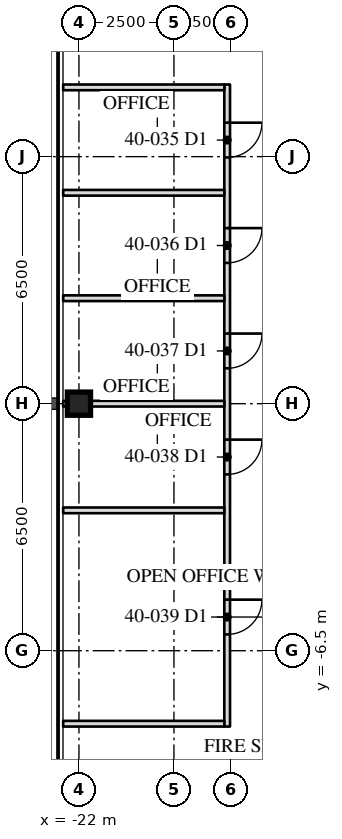
"""IFC4 building model, lengths in metres.
Left out: names, types, materials, properties, quantities, classifications, styles, units other than length and angle.
Written with IfcOpenShell. Run it as: python <this file> out.ifc"""

import sys

from ifc_helpers import new_model, si_unit, direction, frame, frame_2d, origin, origin_2d, place, context, subcontext, project, spatial, rectangle, hollow_rectangle, extrude, element, fill, save


model = new_model("IFC4")
c1 = context("Model", 3, precision=1e-05, world=origin(), true_north=direction((0.0, 1.0)))
c2 = subcontext(c1, "Body", "Model", "MODEL_VIEW")
j1 = project(units=[si_unit("LENGTHUNIT", "METRE"), si_unit("PLANEANGLEUNIT", "RADIAN")], contexts=[c1])
p1 = place(None, origin())
s1 = spatial("IfcSite", under=j1, at=p1, CompositionType="ELEMENT")
p2 = place(p1, origin())
s2 = spatial("IfcBuilding", under=s1, at=p2, CompositionType="ELEMENT")
p3 = place(p2, frame((0.0, 0.0, 170.5)))
s3 = spatial("IfcBuildingStorey", under=s2, at=p3, CompositionType="ELEMENT", Elevation=170.5)
p4 = place(p3, frame((-22.0, 0.0, 0.0), z_axis=(0.0, 0.0, 1.0), x_axis=(0.0, 1.0, 0.0)))
e1 = element("IfcColumn", 1, at=p4, inside=s3, PredefinedType="COLUMN", context=c2, shape_type="SweptSolid", body=[
    extrude(hollow_rectangle(XDim=0.61, YDim=0.61, WallThickness=0.076, at=origin_2d()), origin(), (0.0, 0.0, 1.0), 4.1),
])
p5 = place(p3, frame((-18.1, 8.398, 0.0), z_axis=(0.0, 0.0, 1.0), x_axis=(0.0, -1.0, 0.0)))
e2 = element("IfcWall", 2, at=p5, inside=s3, PredefinedType="PARTITIONING", context=c2, shape_type="SweptSolid", body=[
    extrude(rectangle(XDim=16.894, YDim=0.15, at=frame_2d((8.447, 0.0))), origin(), (0.0, 0.0, 1.0), 3.91),
])
p6 = place(p5, frame((1.004, 0.0, 0.0)))
e3 = element("IfcOpeningElement", 3, at=p6, cuts=e2, PredefinedType="OPENING", context=c2, shape_type="SweptSolid", body=[
    extrude(rectangle(XDim=0.915, YDim=2.134, at=frame_2d((0.458, 1.067))), frame((0.0, 0.085, 0.0), z_axis=(0.0, -1.0, 0.0), x_axis=(1.0, 0.0, 0.0)), (0.0, 0.0, 1.0), 0.17),
])
p7 = place(p5, frame((3.779, 0.0, 0.0)))
e4 = element("IfcOpeningElement", 4, at=p7, cuts=e2, PredefinedType="OPENING", context=c2, shape_type="SweptSolid", body=[
    extrude(rectangle(XDim=0.915, YDim=2.134, at=frame_2d((0.458, 1.067))), frame((0.0, 0.085, 0.0), z_axis=(0.0, -1.0, 0.0), x_axis=(1.0, 0.0, 0.0)), (0.0, 0.0, 1.0), 0.17),
])
p8 = place(p5, frame((6.553, 0.0, 0.0)))
e5 = element("IfcOpeningElement", 5, at=p8, cuts=e2, PredefinedType="OPENING", context=c2, shape_type="SweptSolid", body=[
    extrude(rectangle(XDim=0.915, YDim=2.134, at=frame_2d((0.458, 1.067))), frame((0.0, 0.085, 0.0), z_axis=(0.0, -1.0, 0.0), x_axis=(1.0, 0.0, 0.0)), (0.0, 0.0, 1.0), 0.17),
])
p9 = place(p5, frame((9.344, 0.0, 0.0)))
e6 = element("IfcOpeningElement", 6, at=p9, cuts=e2, PredefinedType="OPENING", context=c2, shape_type="SweptSolid", body=[
    extrude(rectangle(XDim=0.915, YDim=2.134, at=frame_2d((0.458, 1.067))), frame((0.0, 0.085, 0.0), z_axis=(0.0, -1.0, 0.0), x_axis=(1.0, 0.0, 0.0)), (0.0, 0.0, 1.0), 0.17),
])
p10 = place(p5, frame((13.554, 0.0, 0.0)))
e7 = element("IfcOpeningElement", 7, at=p10, cuts=e2, PredefinedType="OPENING", context=c2, shape_type="SweptSolid", body=[
    extrude(rectangle(XDim=0.915, YDim=2.134, at=frame_2d((0.458, 1.067))), frame((0.0, 0.085, 0.0), z_axis=(0.0, -1.0, 0.0), x_axis=(1.0, 0.0, 0.0)), (0.0, 0.0, 1.0), 0.17),
])
for number, where, z_axis, x_axis in (
    (8, (-18.175, 8.323, 0.0), (0.0, 0.0, 1.0), (-1.0, 0.0, 0.0)),
    (9, (-18.175, 5.549, 0.0), (0.0, 0.0, 1.0), (-1.0, 0.0, 0.0)),
    (10, (-18.175, 2.775, 0.0), (0.0, 0.0, 1.0), (-1.0, 0.0, 0.0)),
):
    element("IfcWall", number, at=place(p3, frame(where, z_axis=z_axis, x_axis=x_axis)), inside=s3, PredefinedType="PARTITIONING", context=c2, shape_type="SweptSolid", body=[
        extrude(rectangle(XDim=4.24, YDim=0.15, at=frame_2d((2.12, 0.0))), origin(), (0.0, 0.0, 1.0), 3.91),
    ])
p11 = place(p3, frame((-18.175, 0.0, 0.0), z_axis=(0.0, 0.0, 1.0), x_axis=(-1.0, 0.0, 0.0)))
e11 = element("IfcWall", 11, at=p11, inside=s3, PredefinedType="PARTITIONING", context=c2, shape_type="SweptSolid", body=[
    extrude(rectangle(XDim=4.24, YDim=0.15, at=frame_2d((2.12, 0.0))), origin(), (0.0, 0.0, 1.0), 3.326),
])
for number, where, z_axis, x_axis in (
    (12, (-18.175, -2.807, 0.0), (0.0, 0.0, 1.0), (-1.0, 0.0, 0.0)),
    (13, (-18.175, -8.421, 0.0), (0.0, 0.0, 1.0), (-1.0, 0.0, 0.0)),
):
    element("IfcWall", number, at=place(p3, frame(where, z_axis=z_axis, x_axis=x_axis)), inside=s3, PredefinedType="PARTITIONING", context=c2, shape_type="SweptSolid", body=[
        extrude(rectangle(XDim=4.24, YDim=0.15, at=frame_2d((2.12, 0.0))), origin(), (0.0, 0.0, 1.0), 3.91),
    ])
p12 = place(p6, origin())
e14 = element("IfcDoor", 14, at=p12, inside=s3, OperationType="SINGLE_SWING_LEFT", PredefinedType="DOOR", context=c2, shape_type="SweptSolid", body=[
    extrude(rectangle(XDim=0.915, YDim=2.134, at=frame_2d((0.458, 1.067))), frame((0.0, 0.025, 0.0), z_axis=(0.0, -1.0, 0.0), x_axis=(1.0, 0.0, 0.0)), (0.0, 0.0, 1.0), 0.05),
])
fill(e3, e14)
p13 = place(p7, origin())
e15 = element("IfcDoor", 15, at=p13, inside=s3, OperationType="SINGLE_SWING_LEFT", PredefinedType="DOOR", context=c2, shape_type="SweptSolid", body=[
    extrude(rectangle(XDim=0.915, YDim=2.134, at=frame_2d((0.458, 1.067))), frame((0.0, 0.025, 0.0), z_axis=(0.0, -1.0, 0.0), x_axis=(1.0, 0.0, 0.0)), (0.0, 0.0, 1.0), 0.05),
])
fill(e4, e15)
p14 = place(p8, origin())
e16 = element("IfcDoor", 16, at=p14, inside=s3, OperationType="SINGLE_SWING_LEFT", PredefinedType="DOOR", context=c2, shape_type="SweptSolid", body=[
    extrude(rectangle(XDim=0.915, YDim=2.134, at=frame_2d((0.458, 1.067))), frame((0.0, 0.025, 0.0), z_axis=(0.0, -1.0, 0.0), x_axis=(1.0, 0.0, 0.0)), (0.0, 0.0, 1.0), 0.05),
])
fill(e5, e16)
p15 = place(p9, origin())
e17 = element("IfcDoor", 17, at=p15, inside=s3, OperationType="SINGLE_SWING_LEFT", PredefinedType="DOOR", context=c2, shape_type="SweptSolid", body=[
    extrude(rectangle(XDim=0.915, YDim=2.134, at=frame_2d((0.458, 1.067))), frame((0.0, 0.025, 0.0), z_axis=(0.0, -1.0, 0.0), x_axis=(1.0, 0.0, 0.0)), (0.0, 0.0, 1.0), 0.05),
])
fill(e6, e17)
p16 = place(p10, origin())
e18 = element("IfcDoor", 18, at=p16, inside=s3, OperationType="SINGLE_SWING_LEFT", PredefinedType="DOOR", context=c2, shape_type="SweptSolid", body=[
    extrude(rectangle(XDim=0.915, YDim=2.134, at=frame_2d((0.458, 1.067))), frame((0.0, 0.025, 0.0), z_axis=(0.0, -1.0, 0.0), x_axis=(1.0, 0.0, 0.0)), (0.0, 0.0, 1.0), 0.05),
])
fill(e7, e18)
save(model, sys.argv[1])
